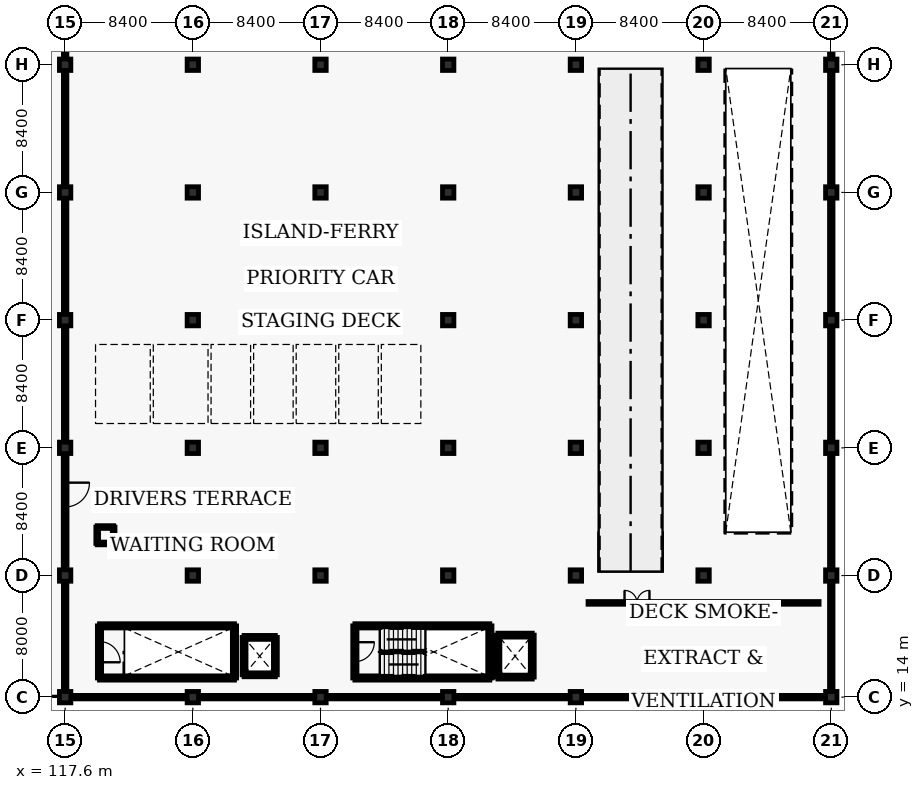
"""IFC4 building model, lengths in metres.
Left out: names, types, materials, properties, quantities, classifications, styles, units other than length and angle.
Written with IfcOpenShell. Run it as: python <this file> out.ifc"""

import sys

from ifc_helpers import new_model, si_unit, direction, frame, frame_2d, origin, origin_2d, place, context, subcontext, project, spatial, rectangle, extrude, element, fill, save


model = new_model("IFC4")
c1 = context("Model", 3, precision=1e-05, world=origin(), true_north=direction((0.0, 1.0)))
c2 = subcontext(c1, "Body", "Model", "MODEL_VIEW")
j1 = project(units=[si_unit("LENGTHUNIT", "METRE"), si_unit("PLANEANGLEUNIT", "RADIAN")], contexts=[c1])
p1 = place(None, origin())
s1 = spatial("IfcSite", under=j1, at=p1, CompositionType="ELEMENT")
p2 = place(p1, origin())
s2 = spatial("IfcBuilding", under=s1, at=p2, CompositionType="ELEMENT")
p3 = place(p2, frame((0.0, 0.0, 9.6)))
s3 = spatial("IfcBuildingStorey", under=s2, at=p3, CompositionType="ELEMENT", Elevation=9.6)
for number, where, z_axis, x_axis in (
    (1, (117.6, 14.0, 0.0), (0.0, 0.0, 1.0), (1.0, 0.0, 0.0)),
    (2, (117.6, 22.0, 0.0), (0.0, 0.0, 1.0), (1.0, 0.0, 0.0)),
    (3, (117.6, 30.4, 0.0), (0.0, 0.0, 1.0), (1.0, 0.0, 0.0)),
    (4, (117.6, 38.8, 0.0), (0.0, 0.0, 1.0), (1.0, 0.0, 0.0)),
    (5, (117.6, 47.2, 0.0), (0.0, 0.0, 1.0), (1.0, 0.0, 0.0)),
    (6, (117.6, 55.6, 0.0), (0.0, 0.0, 1.0), (1.0, 0.0, 0.0)),
    (7, (126.0, 14.0, 0.0), (0.0, 0.0, 1.0), (1.0, 0.0, 0.0)),
    (8, (126.0, 22.0, 0.0), (0.0, 0.0, 1.0), (1.0, 0.0, 0.0)),
    (9, (126.0, 30.4, 0.0), (0.0, 0.0, 1.0), (1.0, 0.0, 0.0)),
    (10, (126.0, 38.8, 0.0), (0.0, 0.0, 1.0), (1.0, 0.0, 0.0)),
    (11, (126.0, 47.2, 0.0), (0.0, 0.0, 1.0), (1.0, 0.0, 0.0)),
    (12, (126.0, 55.6, 0.0), (0.0, 0.0, 1.0), (1.0, 0.0, 0.0)),
    (13, (134.4, 14.0, 0.0), (0.0, 0.0, 1.0), (1.0, 0.0, 0.0)),
    (14, (134.4, 22.0, 0.0), (0.0, 0.0, 1.0), (1.0, 0.0, 0.0)),
    (15, (134.4, 30.4, 0.0), (0.0, 0.0, 1.0), (1.0, 0.0, 0.0)),
    (16, (134.4, 38.8, 0.0), (0.0, 0.0, 1.0), (1.0, 0.0, 0.0)),
    (17, (134.4, 47.2, 0.0), (0.0, 0.0, 1.0), (1.0, 0.0, 0.0)),
    (18, (134.4, 55.6, 0.0), (0.0, 0.0, 1.0), (1.0, 0.0, 0.0)),
    (19, (142.8, 14.0, 0.0), (0.0, 0.0, 1.0), (1.0, 0.0, 0.0)),
    (20, (142.8, 22.0, 0.0), (0.0, 0.0, 1.0), (1.0, 0.0, 0.0)),
    (21, (142.8, 30.4, 0.0), (0.0, 0.0, 1.0), (1.0, 0.0, 0.0)),
    (22, (142.8, 38.8, 0.0), (0.0, 0.0, 1.0), (1.0, 0.0, 0.0)),
    (23, (142.8, 47.2, 0.0), (0.0, 0.0, 1.0), (1.0, 0.0, 0.0)),
    (24, (142.8, 55.6, 0.0), (0.0, 0.0, 1.0), (1.0, 0.0, 0.0)),
    (25, (151.2, 14.0, 0.0), (0.0, 0.0, 1.0), (1.0, 0.0, 0.0)),
    (26, (151.2, 22.0, 0.0), (0.0, 0.0, 1.0), (1.0, 0.0, 0.0)),
    (27, (151.2, 30.4, 0.0), (0.0, 0.0, 1.0), (1.0, 0.0, 0.0)),
    (28, (151.2, 38.8, 0.0), (0.0, 0.0, 1.0), (1.0, 0.0, 0.0)),
    (29, (151.2, 47.2, 0.0), (0.0, 0.0, 1.0), (1.0, 0.0, 0.0)),
    (30, (151.2, 55.6, 0.0), (0.0, 0.0, 1.0), (1.0, 0.0, 0.0)),
    (31, (159.6, 14.0, 0.0), (0.0, 0.0, 1.0), (1.0, 0.0, 0.0)),
    (32, (159.6, 22.0, 0.0), (0.0, 0.0, 1.0), (1.0, 0.0, 0.0)),
    (33, (159.6, 30.4, 0.0), (0.0, 0.0, 1.0), (1.0, 0.0, 0.0)),
    (34, (159.6, 38.8, 0.0), (0.0, 0.0, 1.0), (1.0, 0.0, 0.0)),
    (35, (159.6, 47.2, 0.0), (0.0, 0.0, 1.0), (1.0, 0.0, 0.0)),
    (36, (159.6, 55.6, 0.0), (0.0, 0.0, 1.0), (1.0, 0.0, 0.0)),
    (37, (168.0, 14.0, 0.0), (0.0, 0.0, 1.0), (1.0, 0.0, 0.0)),
    (38, (168.0, 22.0, 0.0), (0.0, 0.0, 1.0), (1.0, 0.0, 0.0)),
    (39, (168.0, 30.4, 0.0), (0.0, 0.0, 1.0), (1.0, 0.0, 0.0)),
    (40, (168.0, 38.8, 0.0), (0.0, 0.0, 1.0), (1.0, 0.0, 0.0)),
    (41, (168.0, 47.2, 0.0), (0.0, 0.0, 1.0), (1.0, 0.0, 0.0)),
    (42, (168.0, 55.6, 0.0), (0.0, 0.0, 1.0), (1.0, 0.0, 0.0)),
):
    element("IfcColumn", number, at=place(p3, frame(where, z_axis=z_axis, x_axis=x_axis)), inside=s3, PredefinedType="COLUMN", context=c2, shape_type="SweptSolid", body=[
        extrude(rectangle(XDim=0.75, YDim=0.75, at=origin_2d()), origin(), (0.0, 0.0, 1.0), 3.52),
    ])
p4 = place(p3, frame((117.6, 30.025, 0.0), z_axis=(0.0, 0.0, 1.0), x_axis=(0.0, -1.0, 0.0)))
e43 = element("IfcWall", 43, at=p4, inside=s3, PredefinedType="SOLIDWALL", context=c2, shape_type="SweptSolid", body=[
    extrude(rectangle(XDim=7.65, YDim=0.25, at=frame_2d((3.825, 0.0))), origin(), (0.0, 0.0, 1.0), 2.585),
])
p5 = place(p4, frame((1.915, 0.0, 0.0)))
e44 = element("IfcOpeningElement", 44, at=p5, cuts=e43, PredefinedType="OPENING", context=c2, shape_type="SweptSolid", body=[
    extrude(rectangle(XDim=1.6, YDim=2.1, at=frame_2d((0.8, 1.05))), frame((0.0, 0.135, 0.0), z_axis=(0.0, -1.0, 0.0), x_axis=(1.0, 0.0, 0.0)), (0.0, 0.0, 1.0), 0.27),
])
p6 = place(p4, frame((4.265, 0.0, 0.9)))
e45 = element("IfcOpeningElement", 45, at=p6, cuts=e43, PredefinedType="OPENING", context=c2, shape_type="SweptSolid", body=[
    extrude(rectangle(XDim=1.95, YDim=1.4, at=frame_2d((0.975, 0.7))), frame((0.0, 0.135, 0.0), z_axis=(0.0, -1.0, 0.0), x_axis=(1.0, 0.0, 0.0)), (0.0, 0.0, 1.0), 0.27),
])
for number, where, z_axis, x_axis in (
    (46, (117.975, 14.0, 0.0), (0.0, 0.0, 1.0), (1.0, 0.0, 0.0)),
    (47, (126.375, 14.0, 0.0), (0.0, 0.0, 1.0), (1.0, 0.0, 0.0)),
):
    element("IfcWall", number, at=place(p3, frame(where, z_axis=z_axis, x_axis=x_axis)), inside=s3, PredefinedType="PARAPET", context=c2, shape_type="SweptSolid", body=[
        extrude(rectangle(XDim=7.65, YDim=0.23, at=frame_2d((3.825, 0.0))), origin(), (0.0, 0.0, 1.0), 1.15),
    ])
p7 = place(p3, frame((134.775, 14.0, 0.0), z_axis=(0.0, 0.0, 1.0), x_axis=(1.0, 0.0, 0.0)))
e48 = element("IfcWall", 48, at=p7, inside=s3, PredefinedType="PARAPET", context=c2, shape_type="SweptSolid", body=[
    extrude(rectangle(XDim=7.65, YDim=0.23, at=frame_2d((3.825, 0.0))), origin(), (0.0, 0.0, 1.0), 1.15),
])
p8 = place(p3, frame((143.175, 14.0, 0.0), z_axis=(0.0, 0.0, 1.0), x_axis=(1.0, 0.0, 0.0)))
e49 = element("IfcWall", 49, at=p8, inside=s3, PredefinedType="PARAPET", context=c2, shape_type="SweptSolid", body=[
    extrude(rectangle(XDim=7.65, YDim=0.23, at=frame_2d((3.825, 0.0))), origin(), (0.0, 0.0, 1.0), 1.15),
])
p9 = place(p3, frame((151.575, 14.0, 0.0), z_axis=(0.0, 0.0, 1.0), x_axis=(1.0, 0.0, 0.0)))
e50 = element("IfcWall", 50, at=p9, inside=s3, PredefinedType="PARAPET", context=c2, shape_type="SweptSolid", body=[
    extrude(rectangle(XDim=7.65, YDim=0.23, at=frame_2d((3.825, 0.0))), origin(), (0.0, 0.0, 1.0), 1.15),
])
p10 = place(p3, frame((159.975, 14.0, 0.0), z_axis=(0.0, 0.0, 1.0), x_axis=(1.0, 0.0, 0.0)))
e51 = element("IfcWall", 51, at=p10, inside=s3, PredefinedType="PARAPET", context=c2, shape_type="SweptSolid", body=[
    extrude(rectangle(XDim=7.65, YDim=0.23, at=frame_2d((3.825, 0.0))), origin(), (0.0, 0.0, 1.0), 1.15),
])
for number, where, z_axis, x_axis in (
    (52, (117.6, 14.375, 0.0), (0.0, 0.0, 1.0), (0.0, 1.0, 0.0)),
    (53, (168.0, 14.375, 0.0), (0.0, 0.0, 1.0), (0.0, 1.0, 0.0)),
):
    element("IfcWall", number, at=place(p3, frame(where, z_axis=z_axis, x_axis=x_axis)), inside=s3, PredefinedType="PARAPET", context=c2, shape_type="SweptSolid", body=[
        extrude(rectangle(XDim=7.25, YDim=0.23, at=frame_2d((3.625, 0.0))), origin(), (0.0, 0.0, 1.0), 1.15),
    ])
p11 = place(p3, frame((168.0, 22.375, 0.0), z_axis=(0.0, 0.0, 1.0), x_axis=(0.0, 1.0, 0.0)))
e54 = element("IfcWall", 54, at=p11, inside=s3, PredefinedType="PARAPET", context=c2, shape_type="SweptSolid", body=[
    extrude(rectangle(XDim=7.65, YDim=0.23, at=frame_2d((3.825, 0.0))), origin(), (0.0, 0.0, 1.0), 1.15),
])
for number, where, z_axis, x_axis in (
    (55, (117.6, 30.775, 0.0), (0.0, 0.0, 1.0), (0.0, 1.0, 0.0)),
    (56, (168.0, 30.775, 0.0), (0.0, 0.0, 1.0), (0.0, 1.0, 0.0)),
):
    element("IfcWall", number, at=place(p3, frame(where, z_axis=z_axis, x_axis=x_axis)), inside=s3, PredefinedType="PARAPET", context=c2, shape_type="SweptSolid", body=[
        extrude(rectangle(XDim=7.65, YDim=0.23, at=frame_2d((3.825, 0.0))), origin(), (0.0, 0.0, 1.0), 1.15),
    ])
for number, where, z_axis, x_axis in (
    (57, (117.6, 39.175, 0.0), (0.0, 0.0, 1.0), (0.0, 1.0, 0.0)),
    (58, (168.0, 39.175, 0.0), (0.0, 0.0, 1.0), (0.0, 1.0, 0.0)),
):
    element("IfcWall", number, at=place(p3, frame(where, z_axis=z_axis, x_axis=x_axis)), inside=s3, PredefinedType="PARAPET", context=c2, shape_type="SweptSolid", body=[
        extrude(rectangle(XDim=7.65, YDim=0.23, at=frame_2d((3.825, 0.0))), origin(), (0.0, 0.0, 1.0), 1.15),
    ])
for number, where, z_axis, x_axis in (
    (59, (117.6, 47.575, 0.0), (0.0, 0.0, 1.0), (0.0, 1.0, 0.0)),
    (60, (168.0, 47.575, 0.0), (0.0, 0.0, 1.0), (0.0, 1.0, 0.0)),
):
    element("IfcWall", number, at=place(p3, frame(where, z_axis=z_axis, x_axis=x_axis)), inside=s3, PredefinedType="PARAPET", context=c2, shape_type="SweptSolid", body=[
        extrude(rectangle(XDim=7.65, YDim=0.23, at=frame_2d((3.825, 0.0))), origin(), (0.0, 0.0, 1.0), 1.15),
    ])
for number, where, z_axis, x_axis in (
    (61, (117.6, 55.975, 0.0), (0.0, 0.0, 1.0), (0.0, 1.0, 0.0)),
    (62, (168.0, 55.975, 0.0), (0.0, 0.0, 1.0), (0.0, 1.0, 0.0)),
):
    element("IfcWall", number, at=place(p3, frame(where, z_axis=z_axis, x_axis=x_axis)), inside=s3, PredefinedType="PARAPET", context=c2, shape_type="SweptSolid", body=[
        extrude(rectangle(XDim=7.65, YDim=0.23, at=frame_2d((3.825, 0.0))), origin(), (0.0, 0.0, 1.0), 1.15),
    ])
for number, where, z_axis, x_axis in (
    (63, (119.86, 15.26, 0.0), (0.0, 0.0, 1.0), (1.0, 0.0, 0.0)),
    (64, (119.86, 18.69, 0.0), (0.0, 0.0, 1.0), (1.0, 0.0, 0.0)),
):
    element("IfcWall", number, at=place(p3, frame(where, z_axis=z_axis, x_axis=x_axis)), inside=s3, PredefinedType="SHEAR", context=c2, shape_type="SweptSolid", body=[
        extrude(rectangle(XDim=8.88, YDim=0.28, at=frame_2d((4.44, 0.0))), origin(), (0.0, 0.0, 1.0), 3.52),
    ])
p12 = place(p3, frame((119.86, 18.69, 0.0), z_axis=(0.0, 0.0, 1.0), x_axis=(0.0, -1.0, 0.0)))
e65 = element("IfcWall", 65, at=p12, inside=s3, PredefinedType="SHEAR", context=c2, shape_type="SweptSolid", body=[
    extrude(rectangle(XDim=3.43, YDim=0.28, at=frame_2d((1.715, 0.0))), origin(), (0.0, 0.0, 1.0), 3.52),
])
p13 = place(p12, frame((1.035, 0.0, 0.0)))
e66 = element("IfcOpeningElement", 66, at=p13, cuts=e65, PredefinedType="OPENING", context=c2, shape_type="SweptSolid", body=[
    extrude(rectangle(XDim=1.36, YDim=2.15, at=frame_2d((0.68, 1.075))), frame((0.0, 0.15, 0.0), z_axis=(0.0, -1.0, 0.0), x_axis=(1.0, 0.0, 0.0)), (0.0, 0.0, 1.0), 0.3),
])
p14 = place(p3, frame((128.74, 15.26, 0.0), z_axis=(0.0, 0.0, 1.0), x_axis=(0.0, 1.0, 0.0)))
e67 = element("IfcWall", 67, at=p14, inside=s3, PredefinedType="SHEAR", context=c2, shape_type="SweptSolid", body=[
    extrude(rectangle(XDim=3.43, YDim=0.28, at=frame_2d((1.715, 0.0))), origin(), (0.0, 0.0, 1.0), 3.52),
])
p15 = place(p3, frame((129.37, 15.47, 0.0), z_axis=(0.0, 0.0, 1.0), x_axis=(1.0, 0.0, 0.0)))
e68 = element("IfcWall", 68, at=p15, inside=s3, PredefinedType="SHEAR", context=c2, shape_type="SweptSolid", body=[
    extrude(rectangle(XDim=2.06, YDim=0.26, at=frame_2d((1.03, 0.0))), origin(), (0.0, 0.0, 1.0), 3.52),
])
for number, where, z_axis, x_axis in (
    (69, (131.43, 15.47, 0.0), (0.0, 0.0, 1.0), (0.0, 1.0, 0.0)),
    (70, (129.37, 17.93, 0.0), (0.0, 0.0, 1.0), (0.0, -1.0, 0.0)),
):
    element("IfcWall", number, at=place(p3, frame(where, z_axis=z_axis, x_axis=x_axis)), inside=s3, PredefinedType="SHEAR", context=c2, shape_type="SweptSolid", body=[
        extrude(rectangle(XDim=2.46, YDim=0.26, at=frame_2d((1.23, 0.0))), origin(), (0.0, 0.0, 1.0), 3.52),
    ])
p16 = place(p3, frame((129.37, 17.93, 0.0), z_axis=(0.0, 0.0, 1.0), x_axis=(1.0, 0.0, 0.0)))
e71 = element("IfcWall", 71, at=p16, inside=s3, PredefinedType="SHEAR", context=c2, shape_type="SweptSolid", body=[
    extrude(rectangle(XDim=2.06, YDim=0.26, at=frame_2d((1.03, 0.0))), origin(), (0.0, 0.0, 1.0), 3.52),
])
p17 = place(p16, frame((0.46, 0.0, 0.0)))
e72 = element("IfcOpeningElement", 72, at=p17, cuts=e71, PredefinedType="OPENING", context=c2, shape_type="SweptSolid", body=[
    extrude(rectangle(XDim=1.14, YDim=2.14, at=frame_2d((0.57, 1.07))), frame((0.0, 0.14, 0.0), z_axis=(0.0, -1.0, 0.0), x_axis=(1.0, 0.0, 0.0)), (0.0, 0.0, 1.0), 0.28),
])
for number, where, z_axis, x_axis in (
    (73, (136.66, 15.26, 0.0), (0.0, 0.0, 1.0), (1.0, 0.0, 0.0)),
    (74, (136.66, 18.69, 0.0), (0.0, 0.0, 1.0), (1.0, 0.0, 0.0)),
):
    element("IfcWall", number, at=place(p3, frame(where, z_axis=z_axis, x_axis=x_axis)), inside=s3, PredefinedType="SHEAR", context=c2, shape_type="SweptSolid", body=[
        extrude(rectangle(XDim=8.88, YDim=0.28, at=frame_2d((4.44, 0.0))), origin(), (0.0, 0.0, 1.0), 3.52),
    ])
p18 = place(p3, frame((136.66, 18.69, 0.0), z_axis=(0.0, 0.0, 1.0), x_axis=(0.0, -1.0, 0.0)))
e75 = element("IfcWall", 75, at=p18, inside=s3, PredefinedType="SHEAR", context=c2, shape_type="SweptSolid", body=[
    extrude(rectangle(XDim=3.43, YDim=0.28, at=frame_2d((1.715, 0.0))), origin(), (0.0, 0.0, 1.0), 3.52),
])
p19 = place(p18, frame((1.075, 0.0, 0.0)))
e76 = element("IfcOpeningElement", 76, at=p19, cuts=e75, PredefinedType="OPENING", context=c2, shape_type="SweptSolid", body=[
    extrude(rectangle(XDim=1.28, YDim=2.1, at=frame_2d((0.64, 1.05))), frame((0.0, 0.15, 0.0), z_axis=(0.0, -1.0, 0.0), x_axis=(1.0, 0.0, 0.0)), (0.0, 0.0, 1.0), 0.3),
])
p20 = place(p3, frame((145.54, 15.26, 0.0), z_axis=(0.0, 0.0, 1.0), x_axis=(0.0, 1.0, 0.0)))
e77 = element("IfcWall", 77, at=p20, inside=s3, PredefinedType="SHEAR", context=c2, shape_type="SweptSolid", body=[
    extrude(rectangle(XDim=3.43, YDim=0.28, at=frame_2d((1.715, 0.0))), origin(), (0.0, 0.0, 1.0), 3.52),
])
p21 = place(p3, frame((146.07, 15.32, 0.0), z_axis=(0.0, 0.0, 1.0), x_axis=(1.0, 0.0, 0.0)))
e78 = element("IfcWall", 78, at=p21, inside=s3, PredefinedType="SHEAR", context=c2, shape_type="SweptSolid", body=[
    extrude(rectangle(XDim=2.26, YDim=0.26, at=frame_2d((1.13, 0.0))), origin(), (0.0, 0.0, 1.0), 3.52),
])
for number, where, z_axis, x_axis in (
    (79, (148.33, 15.32, 0.0), (0.0, 0.0, 1.0), (0.0, 1.0, 0.0)),
    (80, (146.07, 18.08, 0.0), (0.0, 0.0, 1.0), (0.0, -1.0, 0.0)),
):
    element("IfcWall", number, at=place(p3, frame(where, z_axis=z_axis, x_axis=x_axis)), inside=s3, PredefinedType="SHEAR", context=c2, shape_type="SweptSolid", body=[
        extrude(rectangle(XDim=2.76, YDim=0.26, at=frame_2d((1.38, 0.0))), origin(), (0.0, 0.0, 1.0), 3.52),
    ])
p22 = place(p3, frame((146.07, 18.08, 0.0), z_axis=(0.0, 0.0, 1.0), x_axis=(1.0, 0.0, 0.0)))
e81 = element("IfcWall", 81, at=p22, inside=s3, PredefinedType="SHEAR", context=c2, shape_type="SweptSolid", body=[
    extrude(rectangle(XDim=2.26, YDim=0.26, at=frame_2d((1.13, 0.0))), origin(), (0.0, 0.0, 1.0), 3.52),
])
p23 = place(p22, frame((0.51, 0.0, 0.0)))
e82 = element("IfcOpeningElement", 82, at=p23, cuts=e81, PredefinedType="OPENING", context=c2, shape_type="SweptSolid", body=[
    extrude(rectangle(XDim=1.24, YDim=2.14, at=frame_2d((0.62, 1.07))), frame((0.0, 0.14, 0.0), z_axis=(0.0, -1.0, 0.0), x_axis=(1.0, 0.0, 0.0)), (0.0, 0.0, 1.0), 0.28),
])
p24 = place(p3, frame((119.71, 24.11, 0.0), z_axis=(0.0, 0.0, 1.0), x_axis=(1.0, 0.0, 0.0)))
e83 = element("IfcWall", 83, at=p24, inside=s3, PredefinedType="SOLIDWALL", context=c2, shape_type="SweptSolid", body=[
    extrude(rectangle(XDim=1.08, YDim=0.18, at=frame_2d((0.54, 0.0))), origin(), (0.0, 0.0, 1.0), 2.6),
])
p25 = place(p3, frame((120.79, 24.11, 0.0), z_axis=(0.0, 0.0, 1.0), x_axis=(0.0, 1.0, 0.0)))
e84 = element("IfcWall", 84, at=p25, inside=s3, PredefinedType="SOLIDWALL", context=c2, shape_type="SweptSolid", body=[
    extrude(rectangle(XDim=1.08, YDim=0.18, at=frame_2d((0.54, 0.0))), origin(), (0.0, 0.0, 1.0), 2.6),
])
p26 = place(p3, frame((120.79, 25.19, 0.0), z_axis=(0.0, 0.0, 1.0), x_axis=(-1.0, 0.0, 0.0)))
e85 = element("IfcWall", 85, at=p26, inside=s3, PredefinedType="SOLIDWALL", context=c2, shape_type="SweptSolid", body=[
    extrude(rectangle(XDim=1.08, YDim=0.18, at=frame_2d((0.54, 0.0))), origin(), (0.0, 0.0, 1.0), 2.6),
])
p27 = place(p3, frame((119.71, 25.19, 0.0), z_axis=(0.0, 0.0, 1.0), x_axis=(0.0, -1.0, 0.0)))
e86 = element("IfcWall", 86, at=p27, inside=s3, PredefinedType="SOLIDWALL", context=c2, shape_type="SweptSolid", body=[
    extrude(rectangle(XDim=1.08, YDim=0.18, at=frame_2d((0.54, 0.0))), origin(), (0.0, 0.0, 1.0), 2.6),
])
p28 = place(p3, frame((152.0, 20.2, 0.0), z_axis=(0.0, 0.0, 1.0), x_axis=(1.0, 0.0, 0.0)))
e87 = element("IfcWall", 87, at=p28, inside=s3, PredefinedType="SOLIDWALL", context=c2, shape_type="SweptSolid", body=[
    extrude(rectangle(XDim=15.2, YDim=0.18, at=frame_2d((7.6, 0.0))), origin(), (0.0, 0.0, 1.0), 2.505),
])
p29 = place(p28, frame((2.4, 0.0, 0.0)))
e88 = element("IfcOpeningElement", 88, at=p29, cuts=e87, PredefinedType="OPENING", context=c2, shape_type="SweptSolid", body=[
    extrude(rectangle(XDim=1.64, YDim=2.16, at=frame_2d((0.82, 1.08))), frame((0.0, 0.1, 0.0), z_axis=(0.0, -1.0, 0.0), x_axis=(1.0, 0.0, 0.0)), (0.0, 0.0, 1.0), 0.2),
])
p30 = place(p5, origin())
e89 = element("IfcDoor", 89, at=p30, inside=s3, OperationType="SINGLE_SWING_LEFT", PredefinedType="DOOR", context=c2, shape_type="SweptSolid", body=[
    extrude(rectangle(XDim=1.6, YDim=2.1, at=frame_2d((0.8, 1.05))), frame((0.0, 0.025, 0.0), z_axis=(0.0, -1.0, 0.0), x_axis=(1.0, 0.0, 0.0)), (0.0, 0.0, 1.0), 0.05),
])
fill(e44, e89)
p31 = place(p6, origin())
e90 = element("IfcWindow", 90, at=p31, inside=s3, PartitioningType="DOUBLE_PANEL_VERTICAL", PredefinedType="WINDOW", context=c2, shape_type="SweptSolid", body=[
    extrude(rectangle(XDim=1.95, YDim=1.4, at=frame_2d((0.975, 0.7))), frame((0.0, 0.03, 0.0), z_axis=(0.0, -1.0, 0.0), x_axis=(1.0, 0.0, 0.0)), (0.0, 0.0, 1.0), 0.06),
])
fill(e45, e90)
p32 = place(p13, origin())
e91 = element("IfcDoor", 91, at=p32, inside=s3, OperationType="SINGLE_SWING_RIGHT", PredefinedType="DOOR", context=c2, shape_type="SweptSolid", body=[
    extrude(rectangle(XDim=1.36, YDim=2.15, at=frame_2d((0.68, 1.075))), frame((0.0, 0.025, 0.0), z_axis=(0.0, -1.0, 0.0), x_axis=(1.0, 0.0, 0.0)), (0.0, 0.0, 1.0), 0.05),
])
fill(e66, e91)
p33 = place(p17, origin())
e92 = element("IfcDoor", 92, at=p33, inside=s3, OperationType="DOUBLE_DOOR_SLIDING", PredefinedType="DOOR", context=c2, shape_type="SweptSolid", body=[
    extrude(rectangle(XDim=1.14, YDim=2.14, at=frame_2d((0.57, 1.07))), frame((0.0, 0.025, 0.0), z_axis=(0.0, -1.0, 0.0), x_axis=(1.0, 0.0, 0.0)), (0.0, 0.0, 1.0), 0.05),
])
fill(e72, e92)
p34 = place(p19, origin())
e93 = element("IfcDoor", 93, at=p34, inside=s3, OperationType="SINGLE_SWING_LEFT", PredefinedType="DOOR", context=c2, shape_type="SweptSolid", body=[
    extrude(rectangle(XDim=1.28, YDim=2.1, at=frame_2d((0.64, 1.05))), frame((0.0, 0.025, 0.0), z_axis=(0.0, -1.0, 0.0), x_axis=(1.0, 0.0, 0.0)), (0.0, 0.0, 1.0), 0.05),
])
fill(e76, e93)
p35 = place(p23, origin())
e94 = element("IfcDoor", 94, at=p35, inside=s3, OperationType="DOUBLE_DOOR_SLIDING", PredefinedType="DOOR", context=c2, shape_type="SweptSolid", body=[
    extrude(rectangle(XDim=1.24, YDim=2.14, at=frame_2d((0.62, 1.07))), frame((0.0, 0.025, 0.0), z_axis=(0.0, -1.0, 0.0), x_axis=(1.0, 0.0, 0.0)), (0.0, 0.0, 1.0), 0.05),
])
fill(e82, e94)
p36 = place(p29, origin())
e95 = element("IfcDoor", 95, at=p36, inside=s3, OperationType="DOUBLE_DOOR_SINGLE_SWING", PredefinedType="DOOR", context=c2, shape_type="SweptSolid", body=[
    extrude(rectangle(XDim=1.64, YDim=2.16, at=frame_2d((0.82, 1.08))), frame((0.0, 0.025, 0.0), z_axis=(0.0, -1.0, 0.0), x_axis=(1.0, 0.0, 0.0)), (0.0, 0.0, 1.0), 0.05),
])
fill(e88, e95)
save(model, sys.argv[1])
